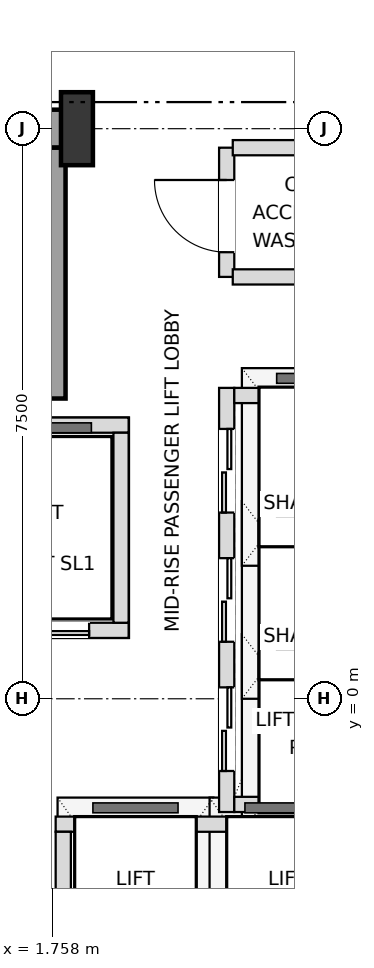
"""IFC4 building model, lengths in metres.
Left out: names, types, materials, properties, quantities, classifications, styles, units other than length and angle.
Written with IfcOpenShell. Run it as: python <this file> out.ifc"""

import sys

from ifc_helpers import new_model, si_unit, direction, frame, frame_2d, origin, origin_2d, place, context, subcontext, project, spatial, rectangle, i_section, extrude, element, fill, save


model = new_model("IFC4")
c1 = context("Model", 3, precision=1e-05, world=origin(), true_north=direction((0.0, 1.0)))
c2 = subcontext(c1, "Body", "Model", "MODEL_VIEW")
j1 = project(units=[si_unit("LENGTHUNIT", "METRE"), si_unit("PLANEANGLEUNIT", "RADIAN")], contexts=[c1])
p1 = place(None, origin())
s1 = spatial("IfcSite", under=j1, at=p1, CompositionType="ELEMENT")
p2 = place(p1, origin())
s2 = spatial("IfcBuilding", under=s1, at=p2, CompositionType="ELEMENT")
p3 = place(p2, frame((0.0, 0.0, 147.6)))
s3 = spatial("IfcBuildingStorey", under=s2, at=p3, CompositionType="ELEMENT", Elevation=147.6)
p4 = place(p3, frame((2.08, 7.5, 0.0), z_axis=(0.0, 0.0, 1.0), x_axis=(1.0, 0.0, 0.0)))
e1 = element("IfcColumn", 1, at=p4, inside=s3, PredefinedType="COLUMN", context=c2, shape_type="SweptSolid", body=[
    extrude(i_section(OverallWidth=0.42, OverallDepth=0.96, WebThickness=0.022, FlangeThickness=0.034, at=origin_2d()), origin(), (0.0, 0.0, 1.0), 3.6),
])
p5 = place(p3, frame((0.0, 7.5, 0.0), z_axis=(0.0, 0.0, 1.0), x_axis=(1.0, 0.0, 0.0)))
e2 = element("IfcWall", 2, at=p5, inside=s3, PredefinedType="SHEAR", context=c2, shape_type="SweptSolid", body=[
    extrude(rectangle(XDim=2.08, YDim=0.5, at=frame_2d((1.04, 0.0))), origin(), (0.0, 0.0, 1.0), 3.38),
])
p6 = place(p3, frame((1.73, 3.95, 0.0), z_axis=(0.0, 0.0, 1.0), x_axis=(0.0, 1.0, 0.0)))
e3 = element("IfcWall", 3, at=p6, inside=s3, PredefinedType="SHEAR", context=c2, shape_type="SweptSolid", body=[
    extrude(rectangle(XDim=3.3, YDim=0.4, at=frame_2d((1.65, 0.0))), origin(), (0.0, 0.0, 1.0), 3.38),
])
p7 = place(p3, frame((4.05, -1.49, 0.0), z_axis=(0.0, 0.0, 1.0), x_axis=(0.0, 1.0, 0.0)))
e4 = element("IfcWall", 4, at=p7, inside=s3, PredefinedType="SOLIDWALL", context=c2, shape_type="SweptSolid", body=[
    extrude(rectangle(XDim=5.58, YDim=0.2, at=frame_2d((2.79, 0.0))), origin(), (0.0, 0.0, 1.0), 3.38),
])
p8 = place(p7, frame((0.54, 0.0, 0.0)))
e5 = element("IfcOpeningElement", 5, at=p8, cuts=e4, PredefinedType="OPENING", context=c2, shape_type="SweptSolid", body=[
    extrude(rectangle(XDim=1.1, YDim=2.15, at=frame_2d((0.55, 1.075))), frame((0.0, 0.11, 0.0), z_axis=(0.0, -1.0, 0.0), x_axis=(1.0, 0.0, 0.0)), (0.0, 0.0, 1.0), 0.22),
])
p9 = place(p7, frame((2.24, 0.0, 0.0)))
e6 = element("IfcOpeningElement", 6, at=p9, cuts=e4, PredefinedType="OPENING", context=c2, shape_type="SweptSolid", body=[
    extrude(rectangle(XDim=1.1, YDim=2.15, at=frame_2d((0.55, 1.075))), frame((0.0, 0.11, 0.0), z_axis=(0.0, -1.0, 0.0), x_axis=(1.0, 0.0, 0.0)), (0.0, 0.0, 1.0), 0.22),
])
p10 = place(p7, frame((3.94, 0.0, 0.0)))
e7 = element("IfcOpeningElement", 7, at=p10, cuts=e4, PredefinedType="OPENING", context=c2, shape_type="SweptSolid", body=[
    extrude(rectangle(XDim=1.1, YDim=2.15, at=frame_2d((0.55, 1.075))), frame((0.0, 0.11, 0.0), z_axis=(0.0, -1.0, 0.0), x_axis=(1.0, 0.0, 0.0)), (0.0, 0.0, 1.0), 0.22),
])
for number, where, z_axis, x_axis in (
    (8, (4.15, -1.39, 0.0), (0.0, 0.0, 1.0), (1.0, 0.0, 0.0)),
    (9, (4.15, 3.99, 0.0), (0.0, 0.0, 1.0), (1.0, 0.0, 0.0)),
):
    element("IfcWall", number, at=place(p3, frame(where, z_axis=z_axis, x_axis=x_axis)), inside=s3, PredefinedType="SOLIDWALL", context=c2, shape_type="SweptSolid", body=[
        extrude(rectangle(XDim=2.2, YDim=0.2, at=frame_2d((1.1, 0.0))), origin(), (0.0, 0.0, 1.0), 3.38),
    ])
p11 = place(p3, frame((-2.82, 0.9, 0.0), z_axis=(0.0, 0.0, 1.0), x_axis=(1.0, 0.0, 0.0)))
e10 = element("IfcWall", 10, at=p11, inside=s3, PredefinedType="SOLIDWALL", context=c2, shape_type="SweptSolid", body=[
    extrude(rectangle(XDim=5.58, YDim=0.2, at=frame_2d((2.79, 0.0))), origin(), (0.0, 0.0, 1.0), 3.38),
])
p12 = place(p11, frame((3.86, 0.0, 0.0)))
e11 = element("IfcOpeningElement", 11, at=p12, cuts=e10, PredefinedType="OPENING", context=c2, shape_type="SweptSolid", body=[
    extrude(rectangle(XDim=1.2, YDim=2.2, at=frame_2d((0.6, 1.1))), frame((0.0, 0.11, 0.0), z_axis=(0.0, -1.0, 0.0), x_axis=(1.0, 0.0, 0.0)), (0.0, 0.0, 1.0), 0.22),
])
p13 = place(p3, frame((-2.82, 3.6, 0.0), z_axis=(0.0, 0.0, 1.0), x_axis=(1.0, 0.0, 0.0)))
e12 = element("IfcWall", 12, at=p13, inside=s3, PredefinedType="SOLIDWALL", context=c2, shape_type="SweptSolid", body=[
    extrude(rectangle(XDim=5.58, YDim=0.2, at=frame_2d((2.79, 0.0))), origin(), (0.0, 0.0, 1.0), 3.38),
])
p14 = place(p3, frame((2.66, 1.0, 0.0), z_axis=(0.0, 0.0, 1.0), x_axis=(0.0, 1.0, 0.0)))
e13 = element("IfcWall", 13, at=p14, inside=s3, PredefinedType="SOLIDWALL", context=c2, shape_type="SweptSolid", body=[
    extrude(rectangle(XDim=2.5, YDim=0.2, at=frame_2d((1.25, 0.0))), origin(), (0.0, 0.0, 1.0), 3.38),
])
p15 = place(p3, frame((1.8, -1.65, 0.0), z_axis=(0.0, 0.0, 1.0), x_axis=(1.0, 0.0, 0.0)))
e14 = element("IfcWall", 14, at=p15, inside=s3, PredefinedType="SOLIDWALL", context=c2, shape_type="SweptSolid", body=[
    extrude(rectangle(XDim=4.1, YDim=0.2, at=frame_2d((2.05, 0.0))), origin(), (0.0, 0.0, 1.0), 3.38),
])
p16 = place(p3, frame((1.9, -3.75, 0.0), z_axis=(0.0, 0.0, 1.0), x_axis=(0.0, 1.0, 0.0)))
e15 = element("IfcWall", 15, at=p16, inside=s3, PredefinedType="SOLIDWALL", context=c2, shape_type="SweptSolid", body=[
    extrude(rectangle(XDim=2.0, YDim=0.2, at=frame_2d((1.0, 0.0))), origin(), (0.0, 0.0, 1.0), 3.38),
])
p17 = place(p3, frame((4.05, 5.55, 0.0), z_axis=(0.0, 0.0, 1.0), x_axis=(0.0, 1.0, 0.0)))
e16 = element("IfcWall", 16, at=p17, inside=s3, PredefinedType="SOLIDWALL", context=c2, shape_type="SweptSolid", body=[
    extrude(rectangle(XDim=1.7, YDim=0.2, at=frame_2d((0.85, 0.0))), origin(), (0.0, 0.0, 1.0), 3.38),
])
p18 = place(p17, frame((0.325, 0.0, 0.0)))
e17 = element("IfcOpeningElement", 17, at=p18, cuts=e16, PredefinedType="OPENING", context=c2, shape_type="SweptSolid", body=[
    extrude(rectangle(XDim=0.95, YDim=2.15, at=frame_2d((0.475, 1.075))), frame((0.0, 0.11, 0.0), z_axis=(0.0, -1.0, 0.0), x_axis=(1.0, 0.0, 0.0)), (0.0, 0.0, 1.0), 0.22),
])
for number, where, z_axis, x_axis in (
    (18, (4.13, 5.55, 0.0), (0.0, 0.0, 1.0), (1.0, 0.0, 0.0)),
    (19, (4.13, 7.25, 0.0), (0.0, 0.0, 1.0), (1.0, 0.0, 0.0)),
):
    element("IfcWall", number, at=place(p3, frame(where, z_axis=z_axis, x_axis=x_axis)), inside=s3, PredefinedType="SOLIDWALL", context=c2, shape_type="SweptSolid", body=[
        extrude(rectangle(XDim=2.07, YDim=0.2, at=frame_2d((1.035, 0.0))), origin(), (0.0, 0.0, 1.0), 3.38),
    ])
p19 = place(p8, origin())
e20 = element("IfcDoor", 20, at=p19, inside=s3, OperationType="DOUBLE_DOOR_SLIDING", PredefinedType="DOOR", context=c2, shape_type="SweptSolid", body=[
    extrude(rectangle(XDim=1.1, YDim=2.15, at=frame_2d((0.55, 1.075))), frame((0.0, 0.025, 0.0), z_axis=(0.0, -1.0, 0.0), x_axis=(1.0, 0.0, 0.0)), (0.0, 0.0, 1.0), 0.05),
])
fill(e5, e20)
p20 = place(p9, origin())
e21 = element("IfcDoor", 21, at=p20, inside=s3, OperationType="DOUBLE_DOOR_SLIDING", PredefinedType="DOOR", context=c2, shape_type="SweptSolid", body=[
    extrude(rectangle(XDim=1.1, YDim=2.15, at=frame_2d((0.55, 1.075))), frame((0.0, 0.025, 0.0), z_axis=(0.0, -1.0, 0.0), x_axis=(1.0, 0.0, 0.0)), (0.0, 0.0, 1.0), 0.05),
])
fill(e6, e21)
p21 = place(p10, origin())
e22 = element("IfcDoor", 22, at=p21, inside=s3, OperationType="DOUBLE_DOOR_SLIDING", PredefinedType="DOOR", context=c2, shape_type="SweptSolid", body=[
    extrude(rectangle(XDim=1.1, YDim=2.15, at=frame_2d((0.55, 1.075))), frame((0.0, 0.025, 0.0), z_axis=(0.0, -1.0, 0.0), x_axis=(1.0, 0.0, 0.0)), (0.0, 0.0, 1.0), 0.05),
])
fill(e7, e22)
p22 = place(p12, origin())
e23 = element("IfcDoor", 23, at=p22, inside=s3, OperationType="DOUBLE_DOOR_SLIDING", PredefinedType="DOOR", context=c2, shape_type="SweptSolid", body=[
    extrude(rectangle(XDim=1.2, YDim=2.2, at=frame_2d((0.6, 1.1))), frame((0.0, 0.025, 0.0), z_axis=(0.0, -1.0, 0.0), x_axis=(1.0, 0.0, 0.0)), (0.0, 0.0, 1.0), 0.05),
])
fill(e11, e23)
p23 = place(p18, origin())
e24 = element("IfcDoor", 24, at=p23, inside=s3, OperationType="SINGLE_SWING_RIGHT", PredefinedType="DOOR", context=c2, shape_type="SweptSolid", body=[
    extrude(rectangle(XDim=0.95, YDim=2.15, at=frame_2d((0.475, 1.075))), frame((0.0, 0.025, 0.0), z_axis=(0.0, -1.0, 0.0), x_axis=(1.0, 0.0, 0.0)), (0.0, 0.0, 1.0), 0.05),
])
fill(e17, e24)
save(model, sys.argv[1])
